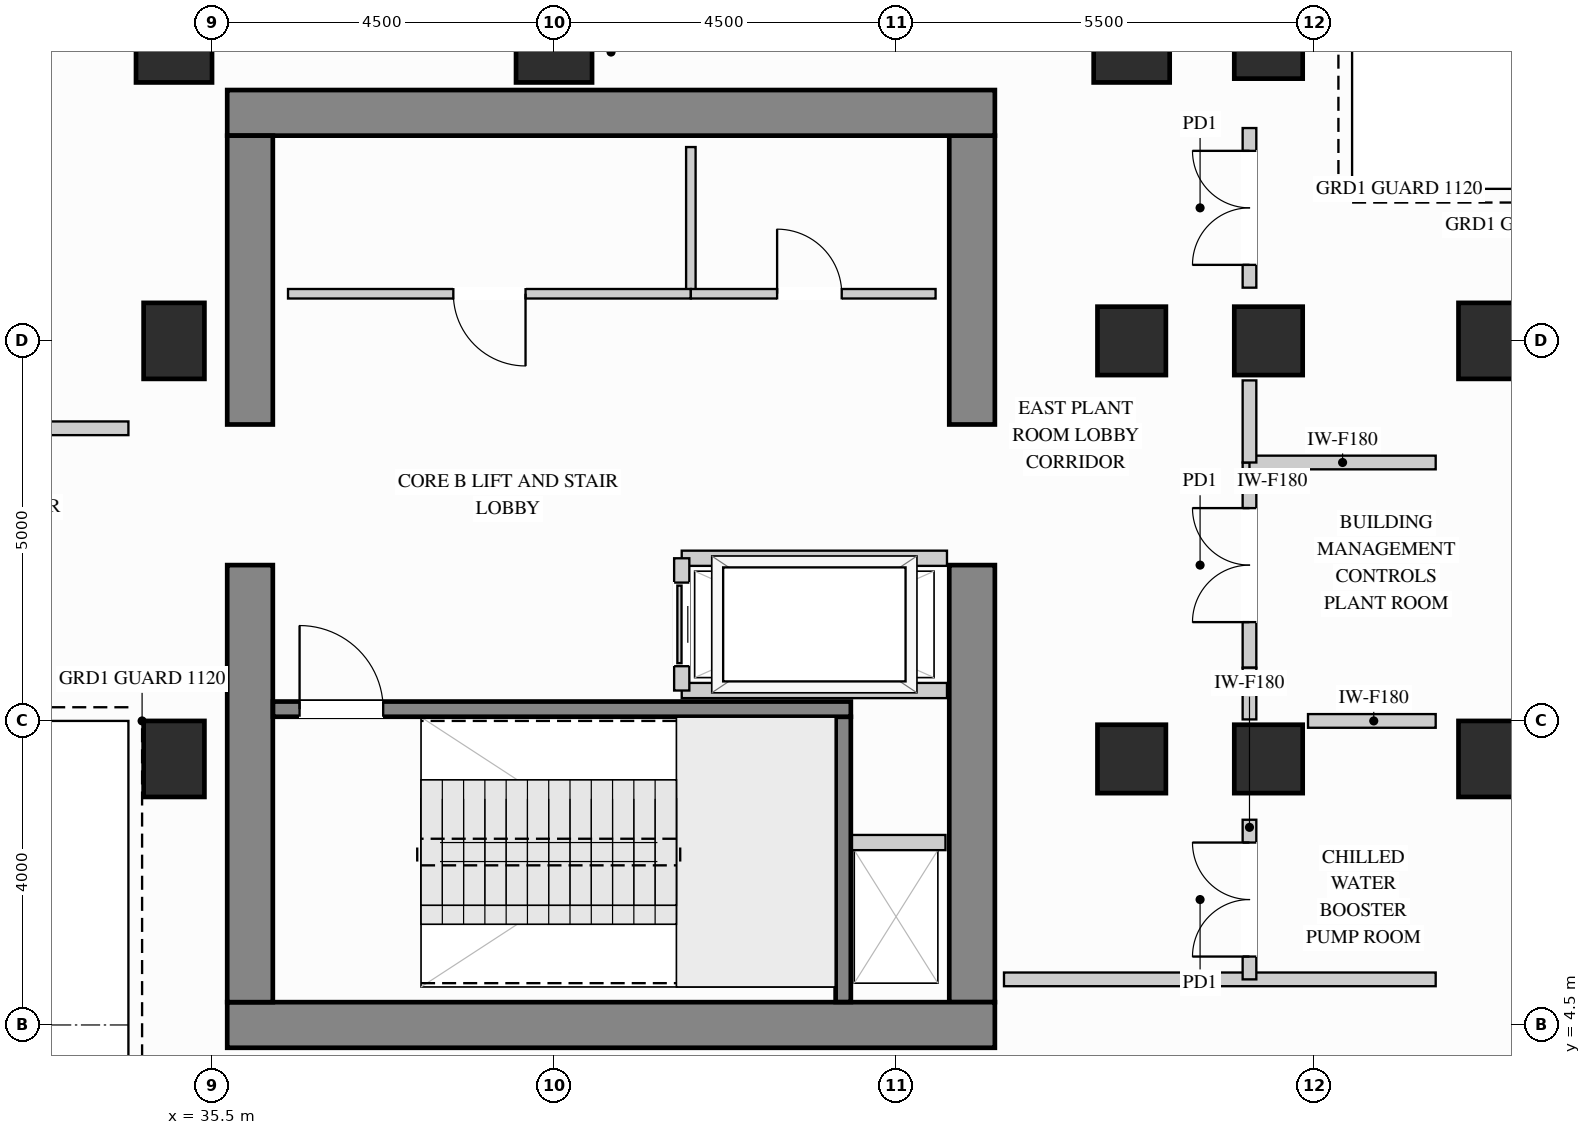
"""IFC4 building model, lengths in metres.
Left out: names, types, materials, properties, quantities, classifications, styles, units other than length and angle.
Written with IfcOpenShell. Run it as: python <this file> out.ifc"""

import sys

from ifc_helpers import new_model, si_unit, direction, frame, frame_2d, origin, origin_2d, place, context, subcontext, project, spatial, rectangle, extrude, source, transform, mapped, element, fill, save


model = new_model("IFC4")
c1 = context("Model", 3, precision=1e-05, world=origin(), true_north=direction((0.0, 1.0)))
c2 = subcontext(c1, "Body", "Model", "MODEL_VIEW")
j1 = project(units=[si_unit("LENGTHUNIT", "METRE"), si_unit("PLANEANGLEUNIT", "RADIAN")], contexts=[c1])
p1 = place(None, origin())
s1 = spatial("IfcSite", under=j1, at=p1, CompositionType="ELEMENT")
p2 = place(p1, origin())
s2 = spatial("IfcBuilding", under=s1, at=p2, CompositionType="ELEMENT")
p3 = place(p2, frame((0.0, 0.0, 207.9)))
s3 = spatial("IfcBuildingStorey", under=s2, at=p3, CompositionType="ELEMENT", Elevation=207.9)
m1 = source(origin(), c2, "Body", "SweptSolid", [
    extrude(rectangle(XDim=0.9, YDim=0.9, at=origin_2d()), origin(), (0.0, 0.0, 1.0), 4.26),
])
for number, where, z_axis, x_axis in (
    (1, (47.6, 13.5, 0.0), (0.0, 0.0, 1.0), (1.0, 0.0, 0.0)),
    (2, (47.6, 8.0, 0.0), (0.0, 0.0, 1.0), (1.0, 0.0, 0.0)),
    (3, (49.4, 13.5, 0.0), (0.0, 0.0, 1.0), (1.0, 0.0, 0.0)),
    (4, (49.4, 17.4, 0.0), (0.0, 0.0, 1.0), (1.0, 0.0, 0.0)),
    (5, (49.4, 8.0, 0.0), (0.0, 0.0, 1.0), (1.0, 0.0, 0.0)),
):
    element("IfcColumn", number, at=place(p3, frame(where, z_axis=z_axis, x_axis=x_axis)), inside=s3, PredefinedType="COLUMN", context=c2, shape_type="MappedRepresentation", body=[
        mapped(m1, transform((0.0, 0.0, 0.0), x_axis=(1.0, 0.0, 0.0), y_axis=(0.0, 1.0, 0.0), z_axis=(0.0, 0.0, 1.0))),
    ])
m2 = source(origin(), c2, "Body", "SweptSolid", [
    extrude(rectangle(XDim=0.8, YDim=1.0, at=origin_2d()), origin(), (0.0, 0.0, 1.0), 4.26),
])
for number, where, z_axis, x_axis in (
    (6, (35.0, 13.5, 0.0), (0.0, 0.0, 1.0), (1.0, 0.0, 0.0)),
    (7, (35.0, 8.0, 0.0), (0.0, 0.0, 1.0), (1.0, 0.0, 0.0)),
):
    element("IfcColumn", number, at=place(p3, frame(where, z_axis=z_axis, x_axis=x_axis)), inside=s3, PredefinedType="COLUMN", context=c2, shape_type="MappedRepresentation", body=[
        mapped(m2, transform((0.0, 0.0, 0.0), x_axis=(1.0, 0.0, 0.0), y_axis=(0.0, 1.0, 0.0), z_axis=(0.0, 0.0, 1.0))),
    ])
m3 = source(origin(), c2, "Body", "SweptSolid", [
    extrude(rectangle(XDim=1.0, YDim=1.0, at=origin_2d()), origin(), (0.0, 0.0, 1.0), 4.26),
])
for number, where, z_axis, x_axis in (
    (8, (35.0, 17.4, 0.0), (0.0, 0.0, 1.0), (1.0, 0.0, 0.0)),
    (9, (40.0, 17.4, 0.0), (0.0, 0.0, 1.0), (1.0, 0.0, 0.0)),
    (10, (47.6, 17.4, 0.0), (0.0, 0.0, 1.0), (1.0, 0.0, 0.0)),
    (11, (52.4, 13.5, 0.0), (0.0, 0.0, 1.0), (1.0, 0.0, 0.0)),
    (12, (52.4, 8.0, 0.0), (0.0, 0.0, 1.0), (1.0, 0.0, 0.0)),
):
    element("IfcColumn", number, at=place(p3, frame(where, z_axis=z_axis, x_axis=x_axis)), inside=s3, PredefinedType="COLUMN", context=c2, shape_type="MappedRepresentation", body=[
        mapped(m3, transform((0.0, 0.0, 0.0), x_axis=(1.0, 0.0, 0.0), y_axis=(0.0, 1.0, 0.0), z_axis=(0.0, 0.0, 1.0))),
    ])
m4 = source(origin(), c2, "Body", "SweptSolid", [
    extrude(rectangle(XDim=5.75, YDim=0.6, at=frame_2d((2.875, 0.0))), origin(), (0.0, 0.0, 1.0), 4.26),
])
p4 = place(p3, frame((45.5, 4.8, 0.0), z_axis=(0.0, 0.0, 1.0), x_axis=(0.0, 1.0, 0.0)))
e13 = element("IfcWall", 13, at=p4, inside=s3, PredefinedType="SHEAR", context=c2, shape_type="MappedRepresentation", body=[
    mapped(m4, transform((0.0, 0.0, 0.0), x_axis=(1.0, 0.0, 0.0), y_axis=(0.0, 1.0, 0.0), z_axis=(0.0, 0.0, 1.0))),
])
m5 = source(origin(), c2, "Body", "SweptSolid", [
    extrude(rectangle(XDim=3.8, YDim=0.6, at=frame_2d((1.9, 0.0))), origin(), (0.0, 0.0, 1.0), 4.26),
])
p5 = place(p3, frame((45.5, 12.4, 0.0), z_axis=(0.0, 0.0, 1.0), x_axis=(0.0, 1.0, 0.0)))
e14 = element("IfcWall", 14, at=p5, inside=s3, PredefinedType="SHEAR", context=c2, shape_type="MappedRepresentation", body=[
    mapped(m5, transform((0.0, 0.0, 0.0), x_axis=(1.0, 0.0, 0.0), y_axis=(0.0, 1.0, 0.0), z_axis=(0.0, 0.0, 1.0))),
])
m6 = source(origin(), c2, "Body", "SweptSolid", [
    extrude(rectangle(XDim=10.1, YDim=0.6, at=frame_2d((5.05, 0.0))), origin(), (0.0, 0.0, 1.0), 4.26),
])
for number, where, z_axis, x_axis in (
    (15, (35.7, 16.5, 0.0), (0.0, 0.0, 1.0), (1.0, 0.0, 0.0)),
    (16, (35.7, 4.5, 0.0), (0.0, 0.0, 1.0), (1.0, 0.0, 0.0)),
):
    element("IfcWall", number, at=place(p3, frame(where, z_axis=z_axis, x_axis=x_axis)), inside=s3, PredefinedType="SHEAR", context=c2, shape_type="MappedRepresentation", body=[
        mapped(m6, transform((0.0, 0.0, 0.0), x_axis=(1.0, 0.0, 0.0), y_axis=(0.0, 1.0, 0.0), z_axis=(0.0, 0.0, 1.0))),
    ])
p6 = place(p3, frame((36.0, 4.8, 0.0), z_axis=(0.0, 0.0, 1.0), x_axis=(0.0, 1.0, 0.0)))
e17 = element("IfcWall", 17, at=p6, inside=s3, PredefinedType="SHEAR", context=c2, shape_type="MappedRepresentation", body=[
    mapped(m4, transform((0.0, 0.0, 0.0), x_axis=(1.0, 0.0, 0.0), y_axis=(0.0, 1.0, 0.0), z_axis=(0.0, 0.0, 1.0))),
])
p7 = place(p3, frame((36.0, 12.4, 0.0), z_axis=(0.0, 0.0, 1.0), x_axis=(0.0, 1.0, 0.0)))
e18 = element("IfcWall", 18, at=p7, inside=s3, PredefinedType="SHEAR", context=c2, shape_type="MappedRepresentation", body=[
    mapped(m5, transform((0.0, 0.0, 0.0), x_axis=(1.0, 0.0, 0.0), y_axis=(0.0, 1.0, 0.0), z_axis=(0.0, 0.0, 1.0))),
])
p8 = place(p3, frame((49.15, 9.2, 0.0), z_axis=(0.0, 0.0, 1.0), x_axis=(0.0, 1.0, 0.0)))
e19 = element("IfcWall", 19, at=p8, inside=s3, PredefinedType="PARTITIONING", context=c2, shape_type="SweptSolid", body=[
    extrude(rectangle(XDim=2.7, YDim=0.18, at=frame_2d((1.35, 0.0))), origin(), (0.0, 0.0, 1.0), 3.245),
])
p9 = place(p8, frame((0.6, 0.0, 0.0)))
e20 = element("IfcOpeningElement", 20, at=p9, cuts=e19, PredefinedType="OPENING", context=c2, shape_type="SweptSolid", body=[
    extrude(rectangle(XDim=1.5, YDim=2.2, at=frame_2d((0.75, 1.1))), frame((0.0, 0.1, 0.0), z_axis=(0.0, -1.0, 0.0), x_axis=(1.0, 0.0, 0.0)), (0.0, 0.0, 1.0), 0.2),
])
m7 = source(origin(), c2, "Body", "SweptSolid", [
    extrude(rectangle(XDim=2.45, YDim=0.18, at=frame_2d((1.225, 0.0))), origin(), (0.0, 0.0, 1.0), 3.776),
])
p10 = place(p3, frame((49.15, 11.9, 0.0), z_axis=(0.0, 0.0, 1.0), x_axis=(1.0, 0.0, 0.0)))
e21 = element("IfcWall", 21, at=p10, inside=s3, PredefinedType="PARTITIONING", context=c2, shape_type="MappedRepresentation", body=[
    mapped(m7, transform((0.0, 0.0, 0.0), x_axis=(1.0, 0.0, 0.0), y_axis=(0.0, 1.0, 0.0), z_axis=(0.0, 0.0, 1.0))),
])
m8 = source(origin(), c2, "Body", "SweptSolid", [
    extrude(rectangle(XDim=5.68, YDim=0.18, at=frame_2d((2.84, 0.0))), origin(), (0.0, 0.0, 1.0), 4.245),
])
p11 = place(p3, frame((45.92, 5.1, 0.0), z_axis=(0.0, 0.0, 1.0), x_axis=(1.0, 0.0, 0.0)))
e22 = element("IfcWall", 22, at=p11, inside=s3, PredefinedType="PARTITIONING", context=c2, shape_type="MappedRepresentation", body=[
    mapped(m8, transform((0.0, 0.0, 0.0), x_axis=(1.0, 0.0, 0.0), y_axis=(0.0, 1.0, 0.0), z_axis=(0.0, 0.0, 1.0))),
])
p12 = place(p3, frame((49.15, 5.1, 0.0), z_axis=(0.0, 0.0, 1.0), x_axis=(0.0, 1.0, 0.0)))
e23 = element("IfcWall", 23, at=p12, inside=s3, PredefinedType="PARTITIONING", context=c2, shape_type="SweptSolid", body=[
    extrude(rectangle(XDim=2.1, YDim=0.18, at=frame_2d((1.05, 0.0))), origin(), (0.0, 0.0, 1.0), 3.245),
])
p13 = place(p12, frame((0.3, 0.0, 0.0)))
e24 = element("IfcOpeningElement", 24, at=p13, cuts=e23, PredefinedType="OPENING", context=c2, shape_type="SweptSolid", body=[
    extrude(rectangle(XDim=1.5, YDim=2.2, at=frame_2d((0.75, 1.1))), frame((0.0, 0.1, 0.0), z_axis=(0.0, -1.0, 0.0), x_axis=(1.0, 0.0, 0.0)), (0.0, 0.0, 1.0), 0.2),
])
m9 = source(origin(), c2, "Body", "SweptSolid", [
    extrude(rectangle(XDim=1.68, YDim=0.18, at=frame_2d((0.84, 0.0))), origin(), (0.0, 0.0, 1.0), 4.245),
])
p14 = place(p3, frame((49.92, 8.5, 0.0), z_axis=(0.0, 0.0, 1.0), x_axis=(1.0, 0.0, 0.0)))
e25 = element("IfcWall", 25, at=p14, inside=s3, PredefinedType="PARTITIONING", context=c2, shape_type="MappedRepresentation", body=[
    mapped(m9, transform((0.0, 0.0, 0.0), x_axis=(1.0, 0.0, 0.0), y_axis=(0.0, 1.0, 0.0), z_axis=(0.0, 0.0, 1.0))),
])
m10 = source(origin(), c2, "Body", "SweptSolid", [
    extrude(rectangle(XDim=0.68, YDim=0.18, at=frame_2d((0.34, 0.0))), origin(), (0.0, 0.0, 1.0), 3.245),
])
p15 = place(p3, frame((49.15, 8.52, 0.0), z_axis=(0.0, 0.0, 1.0), x_axis=(0.0, 1.0, 0.0)))
e26 = element("IfcWall", 26, at=p15, inside=s3, PredefinedType="PARTITIONING", context=c2, shape_type="MappedRepresentation", body=[
    mapped(m10, transform((0.0, 0.0, 0.0), x_axis=(1.0, 0.0, 0.0), y_axis=(0.0, 1.0, 0.0), z_axis=(0.0, 0.0, 1.0))),
])
m11 = source(origin(), c2, "Body", "SweptSolid", [
    extrude(rectangle(XDim=4.55, YDim=0.18, at=frame_2d((2.275, 0.0))), origin(), (0.0, 0.0, 1.0), 4.245),
])
p16 = place(p3, frame((29.85, 12.35, 0.0), z_axis=(0.0, 0.0, 1.0), x_axis=(1.0, 0.0, 0.0)))
e27 = element("IfcWall", 27, at=p16, inside=s3, PredefinedType="PARTITIONING", context=c2, shape_type="MappedRepresentation", body=[
    mapped(m11, transform((0.0, 0.0, 0.0), x_axis=(1.0, 0.0, 0.0), y_axis=(0.0, 1.0, 0.0), z_axis=(0.0, 0.0, 1.0))),
])
p17 = place(p3, frame((49.15, 14.2, 0.0), z_axis=(0.0, 0.0, 1.0), x_axis=(0.0, 1.0, 0.0)))
e28 = element("IfcWall", 28, at=p17, inside=s3, PredefinedType="PARTITIONING", context=c2, shape_type="SweptSolid", body=[
    extrude(rectangle(XDim=2.1, YDim=0.18, at=frame_2d((1.05, 0.0))), origin(), (0.0, 0.0, 1.0), 3.472),
])
p18 = place(p17, frame((0.3, 0.0, 0.0)))
e29 = element("IfcOpeningElement", 29, at=p18, cuts=e28, PredefinedType="OPENING", context=c2, shape_type="SweptSolid", body=[
    extrude(rectangle(XDim=1.5, YDim=2.2, at=frame_2d((0.75, 1.1))), frame((0.0, 0.1, 0.0), z_axis=(0.0, -1.0, 0.0), x_axis=(1.0, 0.0, 0.0)), (0.0, 0.0, 1.0), 0.2),
])
m12 = source(origin(), c2, "Body", "SweptSolid", [
    extrude(rectangle(XDim=1.08, YDim=0.18, at=frame_2d((0.54, 0.0))), origin(), (0.0, 0.0, 1.0), 3.245),
])
p19 = place(p3, frame((49.15, 11.9, 0.0), z_axis=(0.0, 0.0, 1.0), x_axis=(0.0, 1.0, 0.0)))
e30 = element("IfcWall", 30, at=p19, inside=s3, PredefinedType="PARTITIONING", context=c2, shape_type="MappedRepresentation", body=[
    mapped(m12, transform((0.0, 0.0, 0.0), x_axis=(1.0, 0.0, 0.0), y_axis=(0.0, 1.0, 0.0), z_axis=(0.0, 0.0, 1.0))),
])
m13 = source(origin(), c2, "Body", "SweptSolid", [
    extrude(rectangle(XDim=1.93, YDim=0.125, at=frame_2d((0.965, 0.0))), origin(), (0.0, 0.0, 1.0), 4.245),
])
p20 = place(p3, frame((41.8, 14.12, 0.0), z_axis=(0.0, 0.0, 1.0), x_axis=(0.0, 1.0, 0.0)))
e31 = element("IfcWall", 31, at=p20, inside=s3, PredefinedType="PARTITIONING", context=c2, shape_type="MappedRepresentation", body=[
    mapped(m13, transform((0.0, 0.0, 0.0), x_axis=(1.0, 0.0, 0.0), y_axis=(0.0, 1.0, 0.0), z_axis=(0.0, 0.0, 1.0))),
])
p21 = place(p3, frame((36.5, 14.12, 0.0), z_axis=(0.0, 0.0, 1.0), x_axis=(1.0, 0.0, 0.0)))
e32 = element("IfcWall", 32, at=p21, inside=s3, PredefinedType="PARTITIONING", context=c2, shape_type="SweptSolid", body=[
    extrude(rectangle(XDim=5.3, YDim=0.125, at=frame_2d((2.65, 0.0))), origin(), (0.0, 0.0, 1.0), 4.245),
])
p22 = place(p21, frame((2.175, 0.0, 0.0)))
e33 = element("IfcOpeningElement", 33, at=p22, cuts=e32, PredefinedType="OPENING", context=c2, shape_type="SweptSolid", body=[
    extrude(rectangle(XDim=0.95, YDim=2.15, at=frame_2d((0.475, 1.075))), frame((0.0, 0.073, 0.0), z_axis=(0.0, -1.0, 0.0), x_axis=(1.0, 0.0, 0.0)), (0.0, 0.0, 1.0), 0.145),
])
p23 = place(p3, frame((41.8, 14.12, 0.0), z_axis=(0.0, 0.0, 1.0), x_axis=(1.0, 0.0, 0.0)))
e34 = element("IfcWall", 34, at=p23, inside=s3, PredefinedType="PARTITIONING", context=c2, shape_type="SweptSolid", body=[
    extrude(rectangle(XDim=3.22, YDim=0.125, at=frame_2d((1.61, 0.0))), origin(), (0.0, 0.0, 1.0), 4.245),
])
p24 = place(p23, frame((1.135, 0.0, 0.0)))
e35 = element("IfcOpeningElement", 35, at=p24, cuts=e34, PredefinedType="OPENING", context=c2, shape_type="SweptSolid", body=[
    extrude(rectangle(XDim=0.85, YDim=2.1, at=frame_2d((0.425, 1.05))), frame((0.0, 0.073, 0.0), z_axis=(0.0, -1.0, 0.0), x_axis=(1.0, 0.0, 0.0)), (0.0, 0.0, 1.0), 0.145),
])
m14 = source(origin(), c2, "Body", "SweptSolid", [
    extrude(rectangle(XDim=1.3, YDim=0.2, at=frame_2d((0.65, 0.0))), origin(), (0.0, 0.0, 1.0), 4.245),
])
p25 = place(p3, frame((43.85, 6.9, 0.0), z_axis=(0.0, 0.0, 1.0), x_axis=(1.0, 0.0, 0.0)))
e36 = element("IfcWall", 36, at=p25, inside=s3, PredefinedType="PARTITIONING", context=c2, shape_type="MappedRepresentation", body=[
    mapped(m14, transform((0.0, 0.0, 0.0), x_axis=(1.0, 0.0, 0.0), y_axis=(0.0, 1.0, 0.0), z_axis=(0.0, 0.0, 1.0))),
])
m15 = source(origin(), c2, "Body", "SweptSolid", [
    extrude(rectangle(XDim=3.49, YDim=0.2, at=frame_2d((1.745, 0.0))), origin(), (0.0, 0.0, 1.0), 4.245),
])
for number, where, z_axis, x_axis in (
    (37, (41.68, 10.64, 0.0), (0.0, 0.0, 1.0), (1.0, 0.0, 0.0)),
    (38, (41.68, 8.9, 0.0), (0.0, 0.0, 1.0), (1.0, 0.0, 0.0)),
):
    element("IfcWall", number, at=place(p3, frame(where, z_axis=z_axis, x_axis=x_axis)), inside=s3, PredefinedType="PARTITIONING", context=c2, shape_type="MappedRepresentation", body=[
        mapped(m15, transform((0.0, 0.0, 0.0), x_axis=(1.0, 0.0, 0.0), y_axis=(0.0, 1.0, 0.0), z_axis=(0.0, 0.0, 1.0))),
    ])
p26 = place(p3, frame((41.68, 8.9, 0.0), z_axis=(0.0, 0.0, 1.0), x_axis=(0.0, 1.0, 0.0)))
e39 = element("IfcWall", 39, at=p26, inside=s3, PredefinedType="PARTITIONING", context=c2, shape_type="SweptSolid", body=[
    extrude(rectangle(XDim=1.74, YDim=0.2, at=frame_2d((0.87, 0.0))), origin(), (0.0, 0.0, 1.0), 4.245),
])
p27 = place(p26, frame((0.32, 0.0, 0.0)))
e40 = element("IfcOpeningElement", 40, at=p27, cuts=e39, PredefinedType="OPENING", context=c2, shape_type="SweptSolid", body=[
    extrude(rectangle(XDim=1.1, YDim=2.2, at=frame_2d((0.55, 1.1))), frame((0.0, 0.11, 0.0), z_axis=(0.0, -1.0, 0.0), x_axis=(1.0, 0.0, 0.0)), (0.0, 0.0, 1.0), 0.22),
])
m16 = source(origin(), c2, "Body", "SweptSolid", [
    extrude(rectangle(XDim=3.753, YDim=0.2, at=frame_2d((1.876, 0.0))), origin(), (0.0, 0.0, 1.0), 4.26),
])
p28 = place(p3, frame((43.805, 4.802, 0.0), z_axis=(0.0, 0.0, 1.0), x_axis=(0.0, 1.0, 0.0)))
e41 = element("IfcWall", 41, at=p28, inside=s3, PredefinedType="SHEAR", context=c2, shape_type="MappedRepresentation", body=[
    mapped(m16, transform((0.0, 0.0, 0.0), x_axis=(1.0, 0.0, 0.0), y_axis=(0.0, 1.0, 0.0), z_axis=(0.0, 0.0, 1.0))),
])
p29 = place(p3, frame((36.302, 8.655, 0.0), z_axis=(0.0, 0.0, 1.0), x_axis=(1.0, 0.0, 0.0)))
e42 = element("IfcWall", 42, at=p29, inside=s3, PredefinedType="SHEAR", context=c2, shape_type="SweptSolid", body=[
    extrude(rectangle(XDim=7.603, YDim=0.2, at=frame_2d((3.802, 0.0))), origin(), (0.0, 0.0, 1.0), 4.26),
])
p30 = place(p29, frame((0.35, 0.0, 0.0)))
e43 = element("IfcOpeningElement", 43, at=p30, cuts=e42, PredefinedType="OPENING", context=c2, shape_type="SweptSolid", body=[
    extrude(rectangle(XDim=1.1, YDim=2.15, at=frame_2d((0.55, 1.075))), frame((0.0, 0.11, 0.0), z_axis=(0.0, -1.0, 0.0), x_axis=(1.0, 0.0, 0.0)), (0.0, 0.0, 1.0), 0.22),
])
m17 = source(origin(), c2, "Body", "SweptSolid", [
    extrude(rectangle(XDim=1.1, YDim=2.2, at=frame_2d((0.55, 1.1))), frame((0.0, 0.025, 0.0), z_axis=(0.0, -1.0, 0.0), x_axis=(1.0, 0.0, 0.0)), (0.0, 0.0, 1.0), 0.05),
])
p31 = place(p27, origin())
e44 = element("IfcDoor", 44, at=p31, inside=s3, OperationType="SLIDING_TO_LEFT", PredefinedType="DOOR", context=c2, shape_type="MappedRepresentation", body=[
    mapped(m17, transform((0.0, 0.0, 0.0), x_axis=(1.0, 0.0, 0.0), y_axis=(0.0, 1.0, 0.0), z_axis=(0.0, 0.0, 1.0))),
])
fill(e40, e44)
m18 = source(origin(), c2, "Body", "SweptSolid", [
    extrude(rectangle(XDim=0.95, YDim=2.15, at=frame_2d((0.475, 1.075))), frame((0.0, 0.025, 0.0), z_axis=(0.0, -1.0, 0.0), x_axis=(1.0, 0.0, 0.0)), (0.0, 0.0, 1.0), 0.05),
])
p32 = place(p22, origin())
e45 = element("IfcDoor", 45, at=p32, inside=s3, OperationType="SINGLE_SWING_RIGHT", PredefinedType="DOOR", context=c2, shape_type="MappedRepresentation", body=[
    mapped(m18, transform((0.0, 0.0, 0.0), x_axis=(1.0, 0.0, 0.0), y_axis=(0.0, 1.0, 0.0), z_axis=(0.0, 0.0, 1.0))),
])
fill(e33, e45)
m19 = source(origin(), c2, "Body", "SweptSolid", [
    extrude(rectangle(XDim=1.5, YDim=2.2, at=frame_2d((0.75, 1.1))), frame((0.0, 0.025, 0.0), z_axis=(0.0, -1.0, 0.0), x_axis=(1.0, 0.0, 0.0)), (0.0, 0.0, 1.0), 0.05),
])
p33 = place(p9, origin())
e46 = element("IfcDoor", 46, at=p33, inside=s3, OperationType="DOUBLE_DOOR_SINGLE_SWING", PredefinedType="DOOR", context=c2, shape_type="MappedRepresentation", body=[
    mapped(m19, transform((0.0, 0.0, 0.0), x_axis=(1.0, 0.0, 0.0), y_axis=(0.0, 1.0, 0.0), z_axis=(0.0, 0.0, 1.0))),
])
fill(e20, e46)
p34 = place(p13, origin())
e47 = element("IfcDoor", 47, at=p34, inside=s3, OperationType="DOUBLE_DOOR_SINGLE_SWING", PredefinedType="DOOR", context=c2, shape_type="MappedRepresentation", body=[
    mapped(m19, transform((0.0, 0.0, 0.0), x_axis=(1.0, 0.0, 0.0), y_axis=(0.0, 1.0, 0.0), z_axis=(0.0, 0.0, 1.0))),
])
fill(e24, e47)
p35 = place(p18, origin())
e48 = element("IfcDoor", 48, at=p35, inside=s3, OperationType="DOUBLE_DOOR_SINGLE_SWING", PredefinedType="DOOR", context=c2, shape_type="MappedRepresentation", body=[
    mapped(m19, transform((0.0, 0.0, 0.0), x_axis=(1.0, 0.0, 0.0), y_axis=(0.0, 1.0, 0.0), z_axis=(0.0, 0.0, 1.0))),
])
fill(e29, e48)
m20 = source(origin(), c2, "Body", "SweptSolid", [
    extrude(rectangle(XDim=0.85, YDim=2.1, at=frame_2d((0.425, 1.05))), frame((0.0, 0.025, 0.0), z_axis=(0.0, -1.0, 0.0), x_axis=(1.0, 0.0, 0.0)), (0.0, 0.0, 1.0), 0.05),
])
p36 = place(p24, origin())
e49 = element("IfcDoor", 49, at=p36, inside=s3, OperationType="SINGLE_SWING_LEFT", PredefinedType="DOOR", context=c2, shape_type="MappedRepresentation", body=[
    mapped(m20, transform((0.0, 0.0, 0.0), x_axis=(1.0, 0.0, 0.0), y_axis=(0.0, 1.0, 0.0), z_axis=(0.0, 0.0, 1.0))),
])
fill(e35, e49)
m21 = source(origin(), c2, "Body", "SweptSolid", [
    extrude(rectangle(XDim=1.1, YDim=2.15, at=frame_2d((0.55, 1.075))), frame((0.0, 0.025, 0.0), z_axis=(0.0, -1.0, 0.0), x_axis=(1.0, 0.0, 0.0)), (0.0, 0.0, 1.0), 0.05),
])
p37 = place(p30, origin())
e50 = element("IfcDoor", 50, at=p37, inside=s3, OperationType="SINGLE_SWING_LEFT", PredefinedType="DOOR", context=c2, shape_type="MappedRepresentation", body=[
    mapped(m21, transform((0.0, 0.0, 0.0), x_axis=(1.0, 0.0, 0.0), y_axis=(0.0, 1.0, 0.0), z_axis=(0.0, 0.0, 1.0))),
])
fill(e43, e50)
save(model, sys.argv[1])
